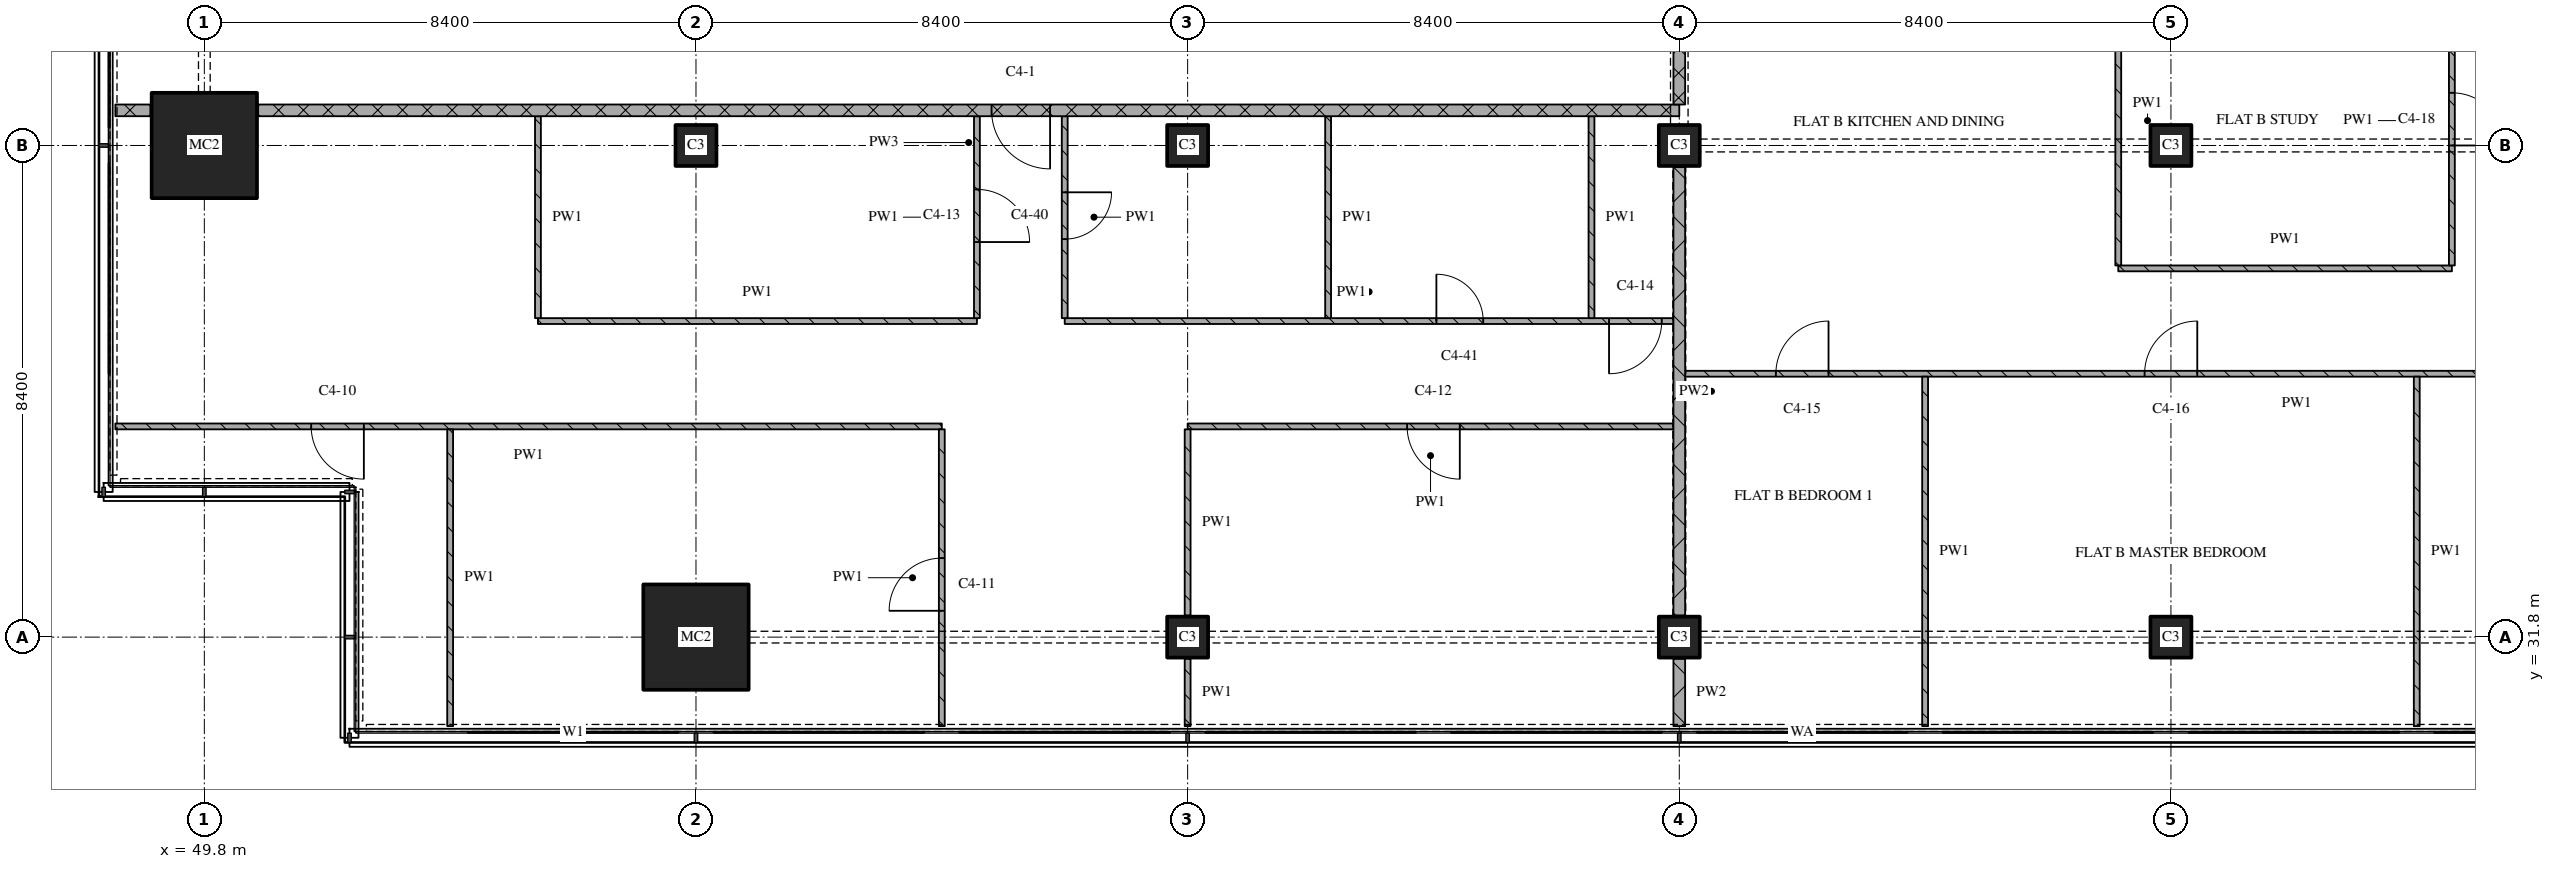
"""IFC4 building model, lengths in metres.
Left out: names, types, materials, properties, quantities, classifications, styles, units other than length and angle.
Written with IfcOpenShell. Run it as: python <this file> out.ifc"""

import sys

from ifc_helpers import new_model, si_unit, direction, frame, frame_2d, origin, origin_2d, place, context, subcontext, project, spatial, rectangle, extrude, element, fill, save


model = new_model("IFC4")
c1 = context("Model", 3, precision=1e-05, world=origin(), true_north=direction((0.0, 1.0)))
c2 = subcontext(c1, "Body", "Model", "MODEL_VIEW")
j1 = project(units=[si_unit("LENGTHUNIT", "METRE"), si_unit("PLANEANGLEUNIT", "RADIAN")], contexts=[c1])
p1 = place(None, origin())
s1 = spatial("IfcSite", under=j1, at=p1, CompositionType="ELEMENT")
p2 = place(p1, origin())
s2 = spatial("IfcBuilding", under=s1, at=p2, CompositionType="ELEMENT")
p3 = place(p2, frame((0.0, 0.0, 179.85)))
s3 = spatial("IfcBuildingStorey", under=s2, at=p3, CompositionType="ELEMENT", Elevation=179.85)
for number, where, z_axis, x_axis in (
    (1, (49.8, 40.2, 0.0), (0.0, 0.0, 1.0), (1.0, 0.0, 0.0)),
    (2, (58.2, 31.8, 0.0), (0.0, 0.0, 1.0), (1.0, 0.0, 0.0)),
):
    element("IfcColumn", number, at=place(p3, frame(where, z_axis=z_axis, x_axis=x_axis)), inside=s3, PredefinedType="COLUMN", context=c2, shape_type="SweptSolid", body=[
        extrude(rectangle(XDim=1.8, YDim=1.8, at=origin_2d()), origin(), (0.0, 0.0, 1.0), 3.6),
    ])
for number, where, z_axis, x_axis in (
    (3, (58.2, 40.2, 0.0), (0.0, 0.0, 1.0), (1.0, 0.0, 0.0)),
    (4, (66.6, 31.8, 0.0), (0.0, 0.0, 1.0), (1.0, 0.0, 0.0)),
    (5, (66.6, 40.2, 0.0), (0.0, 0.0, 1.0), (1.0, 0.0, 0.0)),
    (6, (75.0, 31.8, 0.0), (0.0, 0.0, 1.0), (1.0, 0.0, 0.0)),
    (7, (75.0, 40.2, 0.0), (0.0, 0.0, 1.0), (1.0, 0.0, 0.0)),
    (8, (83.4, 31.8, 0.0), (0.0, 0.0, 1.0), (1.0, 0.0, 0.0)),
    (9, (83.4, 40.2, 0.0), (0.0, 0.0, 1.0), (1.0, 0.0, 0.0)),
):
    element("IfcColumn", number, at=place(p3, frame(where, z_axis=z_axis, x_axis=x_axis)), inside=s3, PredefinedType="COLUMN", context=c2, shape_type="SweptSolid", body=[
        extrude(rectangle(XDim=0.7, YDim=0.7, at=origin_2d()), origin(), (0.0, 0.0, 1.0), 3.6),
    ])
p4 = place(p3, frame((62.4, 35.4, 0.0), z_axis=(0.0, 0.0, 1.0), x_axis=(-1.0, 0.0, 0.0)))
e10 = element("IfcWall", 10, at=p4, inside=s3, PredefinedType="PARTITIONING", context=c2, shape_type="SweptSolid", body=[
    extrude(rectangle(XDim=14.12, YDim=0.1, at=frame_2d((7.06, 0.0))), origin(), (0.0, 0.0, 1.0), 3.32),
])
p5 = place(p4, frame((9.875, 0.0, 0.0)))
e11 = element("IfcOpeningElement", 11, at=p5, cuts=e10, PredefinedType="OPENING", context=c2, shape_type="SweptSolid", body=[
    extrude(rectangle(XDim=0.9, YDim=2.1, at=frame_2d((0.45, 1.05))), frame((0.0, 0.06, 0.0), z_axis=(0.0, -1.0, 0.0), x_axis=(1.0, 0.0, 0.0)), (0.0, 0.0, 1.0), 0.12),
])
p6 = place(p3, frame((74.9, 35.4, 0.0), z_axis=(0.0, 0.0, 1.0), x_axis=(-1.0, 0.0, 0.0)))
e12 = element("IfcWall", 12, at=p6, inside=s3, PredefinedType="PARTITIONING", context=c2, shape_type="SweptSolid", body=[
    extrude(rectangle(XDim=8.3, YDim=0.1, at=frame_2d((4.15, 0.0))), origin(), (0.0, 0.0, 1.0), 3.32),
])
p7 = place(p6, frame((3.65, 0.0, 0.0)))
e13 = element("IfcOpeningElement", 13, at=p7, cuts=e12, PredefinedType="OPENING", context=c2, shape_type="SweptSolid", body=[
    extrude(rectangle(XDim=0.9, YDim=2.1, at=frame_2d((0.45, 1.05))), frame((0.0, 0.06, 0.0), z_axis=(0.0, -1.0, 0.0), x_axis=(1.0, 0.0, 0.0)), (0.0, 0.0, 1.0), 0.12),
])
p8 = place(p3, frame((96.0, 36.3, 0.0), z_axis=(0.0, 0.0, 1.0), x_axis=(-1.0, 0.0, 0.0)))
e14 = element("IfcWall", 14, at=p8, inside=s3, PredefinedType="PARTITIONING", context=c2, shape_type="SweptSolid", body=[
    extrude(rectangle(XDim=20.9, YDim=0.1, at=frame_2d((10.45, 0.0))), origin(), (0.0, 0.0, 1.0), 3.32),
])
p9 = place(p8, frame((12.15, 0.0, 0.0)))
e15 = element("IfcOpeningElement", 15, at=p9, cuts=e14, PredefinedType="OPENING", context=c2, shape_type="SweptSolid", body=[
    extrude(rectangle(XDim=0.9, YDim=2.1, at=frame_2d((0.45, 1.05))), frame((0.0, 0.06, 0.0), z_axis=(0.0, -1.0, 0.0), x_axis=(1.0, 0.0, 0.0)), (0.0, 0.0, 1.0), 0.12),
])
p10 = place(p8, frame((18.45, 0.0, 0.0)))
e16 = element("IfcOpeningElement", 16, at=p10, cuts=e14, PredefinedType="OPENING", context=c2, shape_type="SweptSolid", body=[
    extrude(rectangle(XDim=0.9, YDim=2.1, at=frame_2d((0.45, 1.05))), frame((0.0, 0.06, 0.0), z_axis=(0.0, -1.0, 0.0), x_axis=(1.0, 0.0, 0.0)), (0.0, 0.0, 1.0), 0.12),
])
p11 = place(p3, frame((55.5, 37.2, 0.0), z_axis=(0.0, 0.0, 1.0), x_axis=(1.0, 0.0, 0.0)))
e17 = element("IfcWall", 17, at=p11, inside=s3, PredefinedType="PARTITIONING", context=c2, shape_type="SweptSolid", body=[
    extrude(rectangle(XDim=7.5, YDim=0.1, at=frame_2d((3.75, 0.0))), origin(), (0.0, 0.0, 1.0), 3.32),
])
p12 = place(p3, frame((64.5, 37.2, 0.0), z_axis=(0.0, 0.0, 1.0), x_axis=(1.0, 0.0, 0.0)))
e18 = element("IfcWall", 18, at=p12, inside=s3, PredefinedType="PARTITIONING", context=c2, shape_type="SweptSolid", body=[
    extrude(rectangle(XDim=10.4, YDim=0.1, at=frame_2d((5.2, 0.0))), origin(), (0.0, 0.0, 1.0), 3.32),
])
p13 = place(p12, frame((6.35, 0.0, 0.0)))
e19 = element("IfcOpeningElement", 19, at=p13, cuts=e18, PredefinedType="OPENING", context=c2, shape_type="SweptSolid", body=[
    extrude(rectangle(XDim=0.8, YDim=2.1, at=frame_2d((0.4, 1.05))), frame((0.0, 0.06, 0.0), z_axis=(0.0, -1.0, 0.0), x_axis=(1.0, 0.0, 0.0)), (0.0, 0.0, 1.0), 0.12),
])
p14 = place(p12, frame((9.3, 0.0, 0.0)))
e20 = element("IfcOpeningElement", 20, at=p14, cuts=e18, PredefinedType="OPENING", context=c2, shape_type="SweptSolid", body=[
    extrude(rectangle(XDim=0.9, YDim=2.1, at=frame_2d((0.45, 1.05))), frame((0.0, 0.06, 0.0), z_axis=(0.0, -1.0, 0.0), x_axis=(1.0, 0.0, 0.0)), (0.0, 0.0, 1.0), 0.12),
])
p15 = place(p3, frame((82.5, 38.1, 0.0), z_axis=(0.0, 0.0, 1.0), x_axis=(1.0, 0.0, 0.0)))
e21 = element("IfcWall", 21, at=p15, inside=s3, PredefinedType="PARTITIONING", context=c2, shape_type="SweptSolid", body=[
    extrude(rectangle(XDim=5.7, YDim=0.1, at=frame_2d((2.85, 0.0))), origin(), (0.0, 0.0, 1.0), 3.32),
])
p16 = place(p3, frame((48.28, 40.8, 0.0), z_axis=(0.0, 0.0, 1.0), x_axis=(1.0, 0.0, 0.0)))
e22 = element("IfcWall", 22, at=p16, inside=s3, PredefinedType="PARTITIONING", context=c2, shape_type="SweptSolid", body=[
    extrude(rectangle(XDim=0.6, YDim=0.2, at=frame_2d((0.3, 0.0))), origin(), (0.0, 0.0, 1.0), 3.32),
])
p17 = place(p3, frame((75.0, 40.8, 0.0), z_axis=(0.0, 0.0, 1.0), x_axis=(-1.0, 0.0, 0.0)))
e23 = element("IfcWall", 23, at=p17, inside=s3, PredefinedType="PARTITIONING", context=c2, shape_type="SweptSolid", body=[
    extrude(rectangle(XDim=24.28, YDim=0.2, at=frame_2d((12.14, 0.0))), origin(), (0.0, 0.0, 1.0), 3.32),
])
p18 = place(p17, frame((10.75, 0.0, 0.0)))
e24 = element("IfcOpeningElement", 24, at=p18, cuts=e23, PredefinedType="OPENING", context=c2, shape_type="SweptSolid", body=[
    extrude(rectangle(XDim=1.0, YDim=2.1, at=frame_2d((0.5, 1.05))), frame((0.0, 0.11, 0.0), z_axis=(0.0, -1.0, 0.0), x_axis=(1.0, 0.0, 0.0)), (0.0, 0.0, 1.0), 0.22),
])
p19 = place(p3, frame((54.0, 35.35, 0.0), z_axis=(0.0, 0.0, 1.0), x_axis=(0.0, -1.0, 0.0)))
e25 = element("IfcWall", 25, at=p19, inside=s3, PredefinedType="PARTITIONING", context=c2, shape_type="SweptSolid", body=[
    extrude(rectangle(XDim=5.07, YDim=0.1, at=frame_2d((2.535, 0.0))), origin(), (0.0, 0.0, 1.0), 3.32),
])
p20 = place(p3, frame((55.5, 40.7, 0.0), z_axis=(0.0, 0.0, 1.0), x_axis=(0.0, -1.0, 0.0)))
e26 = element("IfcWall", 26, at=p20, inside=s3, PredefinedType="PARTITIONING", context=c2, shape_type="SweptSolid", body=[
    extrude(rectangle(XDim=3.45, YDim=0.1, at=frame_2d((1.725, 0.0))), origin(), (0.0, 0.0, 1.0), 3.32),
])
p21 = place(p3, frame((62.4, 30.28, 0.0), z_axis=(0.0, 0.0, 1.0), x_axis=(0.0, 1.0, 0.0)))
e27 = element("IfcWall", 27, at=p21, inside=s3, PredefinedType="PARTITIONING", context=c2, shape_type="SweptSolid", body=[
    extrude(rectangle(XDim=5.07, YDim=0.1, at=frame_2d((2.535, 0.0))), origin(), (0.0, 0.0, 1.0), 3.32),
])
p22 = place(p21, frame((1.97, 0.0, 0.0)))
e28 = element("IfcOpeningElement", 28, at=p22, cuts=e27, PredefinedType="OPENING", context=c2, shape_type="SweptSolid", body=[
    extrude(rectangle(XDim=0.9, YDim=2.1, at=frame_2d((0.45, 1.05))), frame((0.0, 0.06, 0.0), z_axis=(0.0, -1.0, 0.0), x_axis=(1.0, 0.0, 0.0)), (0.0, 0.0, 1.0), 0.12),
])
p23 = place(p3, frame((63.0, 37.25, 0.0), z_axis=(0.0, 0.0, 1.0), x_axis=(0.0, 1.0, 0.0)))
e29 = element("IfcWall", 29, at=p23, inside=s3, PredefinedType="PARTITIONING", context=c2, shape_type="SweptSolid", body=[
    extrude(rectangle(XDim=3.45, YDim=0.1, at=frame_2d((1.725, 0.0))), origin(), (0.0, 0.0, 1.0), 3.32),
])
p24 = place(p23, frame((1.3, 0.0, 0.0)))
e30 = element("IfcOpeningElement", 30, at=p24, cuts=e29, PredefinedType="OPENING", context=c2, shape_type="SweptSolid", body=[
    extrude(rectangle(XDim=0.9, YDim=2.1, at=frame_2d((0.45, 1.05))), frame((0.0, 0.06, 0.0), z_axis=(0.0, -1.0, 0.0), x_axis=(1.0, 0.0, 0.0)), (0.0, 0.0, 1.0), 0.12),
])
p25 = place(p3, frame((64.5, 40.7, 0.0), z_axis=(0.0, 0.0, 1.0), x_axis=(0.0, -1.0, 0.0)))
e31 = element("IfcWall", 31, at=p25, inside=s3, PredefinedType="PARTITIONING", context=c2, shape_type="SweptSolid", body=[
    extrude(rectangle(XDim=3.45, YDim=0.1, at=frame_2d((1.725, 0.0))), origin(), (0.0, 0.0, 1.0), 3.32),
])
p26 = place(p25, frame((1.3, 0.0, 0.0)))
e32 = element("IfcOpeningElement", 32, at=p26, cuts=e31, PredefinedType="OPENING", context=c2, shape_type="SweptSolid", body=[
    extrude(rectangle(XDim=0.8, YDim=2.1, at=frame_2d((0.4, 1.05))), frame((0.0, 0.06, 0.0), z_axis=(0.0, -1.0, 0.0), x_axis=(1.0, 0.0, 0.0)), (0.0, 0.0, 1.0), 0.12),
])
p27 = place(p3, frame((66.6, 31.43, 0.0), z_axis=(0.0, 0.0, 1.0), x_axis=(0.0, -1.0, 0.0)))
e33 = element("IfcWall", 33, at=p27, inside=s3, PredefinedType="PARTITIONING", context=c2, shape_type="SweptSolid", body=[
    extrude(rectangle(XDim=1.15, YDim=0.1, at=frame_2d((0.575, 0.0))), origin(), (0.0, 0.0, 1.0), 3.32),
])
p28 = place(p3, frame((66.6, 35.35, 0.0), z_axis=(0.0, 0.0, 1.0), x_axis=(0.0, -1.0, 0.0)))
e34 = element("IfcWall", 34, at=p28, inside=s3, PredefinedType="PARTITIONING", context=c2, shape_type="SweptSolid", body=[
    extrude(rectangle(XDim=3.18, YDim=0.1, at=frame_2d((1.59, 0.0))), origin(), (0.0, 0.0, 1.0), 3.32),
])
for number, where, z_axis, x_axis in (
    (35, (69.0, 40.7, 0.0), (0.0, 0.0, 1.0), (0.0, -1.0, 0.0)),
    (36, (73.5, 40.7, 0.0), (0.0, 0.0, 1.0), (0.0, -1.0, 0.0)),
):
    element("IfcWall", number, at=place(p3, frame(where, z_axis=z_axis, x_axis=x_axis)), inside=s3, PredefinedType="PARTITIONING", context=c2, shape_type="SweptSolid", body=[
        extrude(rectangle(XDim=3.45, YDim=0.1, at=frame_2d((1.725, 0.0))), origin(), (0.0, 0.0, 1.0), 3.32),
    ])
p29 = place(p3, frame((75.0, 43.1, 0.0), z_axis=(0.0, 0.0, 1.0), x_axis=(0.0, -1.0, 0.0)))
e37 = element("IfcWall", 37, at=p29, inside=s3, PredefinedType="PARTITIONING", context=c2, shape_type="SweptSolid", body=[
    extrude(rectangle(XDim=2.2, YDim=0.2, at=frame_2d((1.1, 0.0))), origin(), (0.0, 0.0, 1.0), 2.43),
])
p30 = place(p3, frame((75.0, 31.43, 0.0), z_axis=(0.0, 0.0, 1.0), x_axis=(0.0, -1.0, 0.0)))
e38 = element("IfcWall", 38, at=p30, inside=s3, PredefinedType="PARTITIONING", context=c2, shape_type="SweptSolid", body=[
    extrude(rectangle(XDim=1.15, YDim=0.2, at=frame_2d((0.575, 0.0))), origin(), (0.0, 0.0, 1.0), 3.32),
])
p31 = place(p3, frame((75.0, 39.83, 0.0), z_axis=(0.0, 0.0, 1.0), x_axis=(0.0, -1.0, 0.0)))
e39 = element("IfcWall", 39, at=p31, inside=s3, PredefinedType="PARTITIONING", context=c2, shape_type="SweptSolid", body=[
    extrude(rectangle(XDim=7.66, YDim=0.2, at=frame_2d((3.83, 0.0))), origin(), (0.0, 0.0, 1.0), 2.72),
])
p32 = place(p3, frame((79.2, 36.25, 0.0), z_axis=(0.0, 0.0, 1.0), x_axis=(0.0, -1.0, 0.0)))
e40 = element("IfcWall", 40, at=p32, inside=s3, PredefinedType="PARTITIONING", context=c2, shape_type="SweptSolid", body=[
    extrude(rectangle(XDim=5.97, YDim=0.1, at=frame_2d((2.985, 0.0))), origin(), (0.0, 0.0, 1.0), 3.32),
])
p33 = place(p3, frame((82.5, 43.1, 0.0), z_axis=(0.0, 0.0, 1.0), x_axis=(0.0, -1.0, 0.0)))
e41 = element("IfcWall", 41, at=p33, inside=s3, PredefinedType="PARTITIONING", context=c2, shape_type="SweptSolid", body=[
    extrude(rectangle(XDim=4.95, YDim=0.1, at=frame_2d((2.475, 0.0))), origin(), (0.0, 0.0, 1.0), 3.32),
])
p34 = place(p3, frame((87.6, 36.25, 0.0), z_axis=(0.0, 0.0, 1.0), x_axis=(0.0, -1.0, 0.0)))
e42 = element("IfcWall", 42, at=p34, inside=s3, PredefinedType="PARTITIONING", context=c2, shape_type="SweptSolid", body=[
    extrude(rectangle(XDim=5.97, YDim=0.1, at=frame_2d((2.985, 0.0))), origin(), (0.0, 0.0, 1.0), 3.32),
])
p35 = place(p3, frame((88.2, 38.15, 0.0), z_axis=(0.0, 0.0, 1.0), x_axis=(0.0, 1.0, 0.0)))
e43 = element("IfcWall", 43, at=p35, inside=s3, PredefinedType="PARTITIONING", context=c2, shape_type="SweptSolid", body=[
    extrude(rectangle(XDim=4.95, YDim=0.1, at=frame_2d((2.475, 0.0))), origin(), (0.0, 0.0, 1.0), 3.32),
])
p36 = place(p35, frame((2.05, 0.0, 0.0)))
e44 = element("IfcOpeningElement", 44, at=p36, cuts=e43, PredefinedType="OPENING", context=c2, shape_type="SweptSolid", body=[
    extrude(rectangle(XDim=0.9, YDim=2.1, at=frame_2d((0.45, 1.05))), frame((0.0, 0.06, 0.0), z_axis=(0.0, -1.0, 0.0), x_axis=(1.0, 0.0, 0.0)), (0.0, 0.0, 1.0), 0.12),
])
p37 = place(p5, origin())
e45 = element("IfcDoor", 45, at=p37, inside=s3, OperationType="SINGLE_SWING_LEFT", PredefinedType="DOOR", context=c2, shape_type="SweptSolid", body=[
    extrude(rectangle(XDim=0.9, YDim=2.1, at=frame_2d((0.45, 1.05))), frame((0.0, 0.025, 0.0), z_axis=(0.0, -1.0, 0.0), x_axis=(1.0, 0.0, 0.0)), (0.0, 0.0, 1.0), 0.05),
])
fill(e11, e45)
p38 = place(p7, origin())
e46 = element("IfcDoor", 46, at=p38, inside=s3, OperationType="SINGLE_SWING_LEFT", PredefinedType="DOOR", context=c2, shape_type="SweptSolid", body=[
    extrude(rectangle(XDim=0.9, YDim=2.1, at=frame_2d((0.45, 1.05))), frame((0.0, 0.025, 0.0), z_axis=(0.0, -1.0, 0.0), x_axis=(1.0, 0.0, 0.0)), (0.0, 0.0, 1.0), 0.05),
])
fill(e13, e46)
p39 = place(p9, origin())
e47 = element("IfcDoor", 47, at=p39, inside=s3, OperationType="SINGLE_SWING_RIGHT", PredefinedType="DOOR", context=c2, shape_type="SweptSolid", body=[
    extrude(rectangle(XDim=0.9, YDim=2.1, at=frame_2d((0.45, 1.05))), frame((0.0, 0.025, 0.0), z_axis=(0.0, -1.0, 0.0), x_axis=(1.0, 0.0, 0.0)), (0.0, 0.0, 1.0), 0.05),
])
fill(e15, e47)
p40 = place(p10, origin())
e48 = element("IfcDoor", 48, at=p40, inside=s3, OperationType="SINGLE_SWING_RIGHT", PredefinedType="DOOR", context=c2, shape_type="SweptSolid", body=[
    extrude(rectangle(XDim=0.9, YDim=2.1, at=frame_2d((0.45, 1.05))), frame((0.0, 0.025, 0.0), z_axis=(0.0, -1.0, 0.0), x_axis=(1.0, 0.0, 0.0)), (0.0, 0.0, 1.0), 0.05),
])
fill(e16, e48)
p41 = place(p13, origin())
e49 = element("IfcDoor", 49, at=p41, inside=s3, OperationType="SINGLE_SWING_LEFT", PredefinedType="DOOR", context=c2, shape_type="SweptSolid", body=[
    extrude(rectangle(XDim=0.8, YDim=2.1, at=frame_2d((0.4, 1.05))), frame((0.0, 0.025, 0.0), z_axis=(0.0, -1.0, 0.0), x_axis=(1.0, 0.0, 0.0)), (0.0, 0.0, 1.0), 0.05),
])
fill(e19, e49)
p42 = place(p14, origin())
e50 = element("IfcDoor", 50, at=p42, inside=s3, OperationType="SINGLE_SWING_RIGHT", PredefinedType="DOOR", context=c2, shape_type="SweptSolid", body=[
    extrude(rectangle(XDim=0.9, YDim=2.1, at=frame_2d((0.45, 1.05))), frame((0.0, 0.025, 0.0), z_axis=(0.0, -1.0, 0.0), x_axis=(1.0, 0.0, 0.0)), (0.0, 0.0, 1.0), 0.05),
])
fill(e20, e50)
p43 = place(p18, origin())
e51 = element("IfcDoor", 51, at=p43, inside=s3, OperationType="SINGLE_SWING_LEFT", PredefinedType="DOOR", context=c2, shape_type="SweptSolid", body=[
    extrude(rectangle(XDim=1.0, YDim=2.1, at=frame_2d((0.5, 1.05))), frame((0.0, 0.025, 0.0), z_axis=(0.0, -1.0, 0.0), x_axis=(1.0, 0.0, 0.0)), (0.0, 0.0, 1.0), 0.05),
])
fill(e24, e51)
p44 = place(p22, origin())
e52 = element("IfcDoor", 52, at=p44, inside=s3, OperationType="SINGLE_SWING_LEFT", PredefinedType="DOOR", context=c2, shape_type="SweptSolid", body=[
    extrude(rectangle(XDim=0.9, YDim=2.1, at=frame_2d((0.45, 1.05))), frame((0.0, 0.025, 0.0), z_axis=(0.0, -1.0, 0.0), x_axis=(1.0, 0.0, 0.0)), (0.0, 0.0, 1.0), 0.05),
])
fill(e28, e52)
p45 = place(p24, origin())
e53 = element("IfcDoor", 53, at=p45, inside=s3, OperationType="SINGLE_SWING_RIGHT", PredefinedType="DOOR", context=c2, shape_type="SweptSolid", body=[
    extrude(rectangle(XDim=0.9, YDim=2.1, at=frame_2d((0.45, 1.05))), frame((0.0, 0.025, 0.0), z_axis=(0.0, -1.0, 0.0), x_axis=(1.0, 0.0, 0.0)), (0.0, 0.0, 1.0), 0.05),
])
fill(e30, e53)
p46 = place(p26, origin())
e54 = element("IfcDoor", 54, at=p46, inside=s3, OperationType="SINGLE_SWING_LEFT", PredefinedType="DOOR", context=c2, shape_type="SweptSolid", body=[
    extrude(rectangle(XDim=0.8, YDim=2.1, at=frame_2d((0.4, 1.05))), frame((0.0, 0.025, 0.0), z_axis=(0.0, -1.0, 0.0), x_axis=(1.0, 0.0, 0.0)), (0.0, 0.0, 1.0), 0.05),
])
fill(e32, e54)
p47 = place(p36, origin())
e55 = element("IfcDoor", 55, at=p47, inside=s3, OperationType="SINGLE_SWING_RIGHT", PredefinedType="DOOR", context=c2, shape_type="SweptSolid", body=[
    extrude(rectangle(XDim=0.9, YDim=2.1, at=frame_2d((0.45, 1.05))), frame((0.0, 0.025, 0.0), z_axis=(0.0, -1.0, 0.0), x_axis=(1.0, 0.0, 0.0)), (0.0, 0.0, 1.0), 0.05),
])
fill(e44, e55)
save(model, sys.argv[1])
